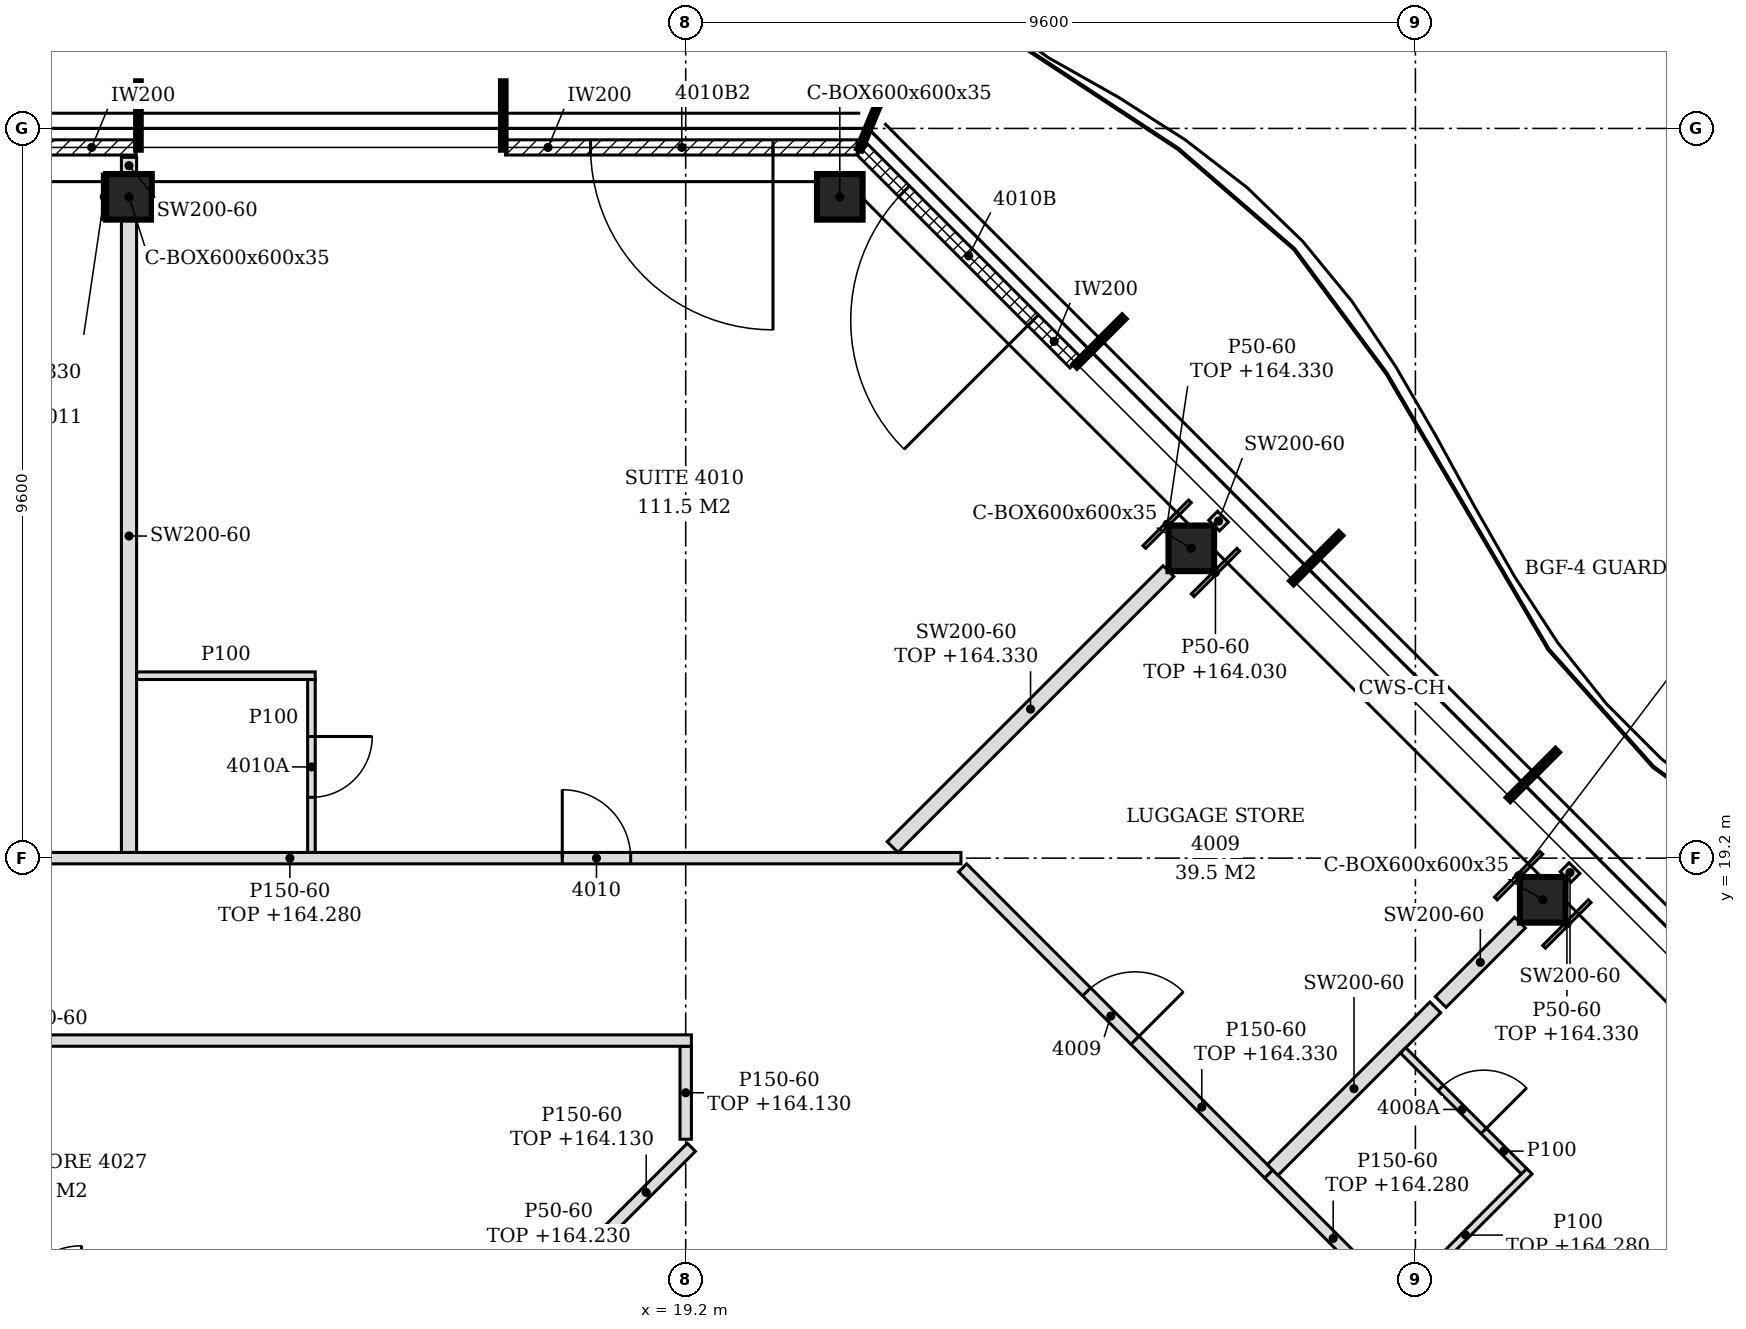
"""IFC4 building model, lengths in metres.
Left out: names, types, materials, properties, quantities, classifications, styles, units other than length and angle.
Written with IfcOpenShell. Run it as: python <this file> out.ifc"""

import sys

from ifc_helpers import new_model, si_unit, direction, frame, frame_2d, origin, origin_2d, place, context, subcontext, project, spatial, polyline, rectangle, hollow_rectangle, outline, extrude, element, fill, save


model = new_model("IFC4")
c1 = context("Model", 3, precision=1e-05, world=origin(), true_north=direction((0.0, 1.0)))
c2 = subcontext(c1, "Body", "Model", "MODEL_VIEW")
j1 = project(units=[si_unit("LENGTHUNIT", "METRE"), si_unit("PLANEANGLEUNIT", "RADIAN")], contexts=[c1])
p1 = place(None, origin())
s1 = spatial("IfcSite", under=j1, at=p1, CompositionType="ELEMENT")
p2 = place(p1, origin())
s2 = spatial("IfcBuilding", under=s1, at=p2, CompositionType="ELEMENT")
p3 = place(p2, frame((0.0, 0.0, 161.4)))
s3 = spatial("IfcBuildingStorey", under=s2, at=p3, CompositionType="ELEMENT", Elevation=161.4)
for number, where, z_axis, x_axis in (
    (1, (30.476, 18.652, -0.15), (0.0, 0.0, 1.0), (1.0, 0.0, 0.0)),
    (2, (25.852, 23.276, -0.15), (0.0, 0.0, 1.0), (1.0, 0.0, 0.0)),
    (3, (21.227, 27.9, -0.15), (0.0, 0.0, 1.0), (1.0, 0.0, 0.0)),
    (4, (11.876, 27.9, -0.15), (0.0, 0.0, 1.0), (1.0, 0.0, 0.0)),
):
    element("IfcColumn", number, at=place(p3, frame(where, z_axis=z_axis, x_axis=x_axis)), inside=s3, PredefinedType="COLUMN", context=c2, shape_type="SweptSolid", body=[
        extrude(hollow_rectangle(XDim=0.6, YDim=0.6, WallThickness=0.035, at=origin_2d()), origin(), (0.0, 0.0, 1.0), 3.6),
    ])
p4 = place(p3, frame((24.326, 25.72, 0.0), z_axis=(0.0, 0.0, 1.0), x_axis=(-0.707106781187, 0.707106781187, 0.0)))
e5 = element("IfcWall", 5, at=p4, inside=s3, PredefinedType="NOTDEFINED", context=c2, shape_type="SweptSolid", body=[
    extrude(rectangle(XDim=3.962, YDim=0.2, at=frame_2d((1.981, 0.0))), origin(), (0.0, 0.0, 1.0), 3.45),
])
p5 = place(p4, frame((0.786, 0.0, 0.0)))
e6 = element("IfcOpeningElement", 6, at=p5, cuts=e5, PredefinedType="OPENING", context=c2, shape_type="SweptSolid", body=[
    extrude(rectangle(XDim=2.4, YDim=2.4, at=frame_2d((1.2, 1.2))), frame((0.0, 0.11, 0.0), z_axis=(0.0, -1.0, 0.0), x_axis=(1.0, 0.0, 0.0)), (0.0, 0.0, 1.0), 0.22),
])
p6 = place(p3, frame((21.457, 28.55, 0.0), z_axis=(0.0, 0.0, 1.0), x_axis=(-1.0, 0.0, 0.0)))
e7 = element("IfcWall", 7, at=p6, inside=s3, PredefinedType="NOTDEFINED", context=c2, shape_type="SweptSolid", body=[
    extrude(rectangle(XDim=4.626, YDim=0.2, at=frame_2d((2.313, 0.0))), origin(), (0.0, 0.0, 1.0), 3.45),
])
p7 = place(p6, frame((1.108, 0.0, 0.0)))
e8 = element("IfcOpeningElement", 8, at=p7, cuts=e7, PredefinedType="OPENING", context=c2, shape_type="SweptSolid", body=[
    extrude(rectangle(XDim=2.4, YDim=2.4, at=frame_2d((1.2, 1.2))), frame((0.0, 0.11, 0.0), z_axis=(0.0, -1.0, 0.0), x_axis=(1.0, 0.0, 0.0)), (0.0, 0.0, 1.0), 0.22),
])
p8 = place(p3, frame((11.97, 28.55, 0.0), z_axis=(0.0, 0.0, 1.0), x_axis=(-1.0, 0.0, 0.0)))
e9 = element("IfcWall", 9, at=p8, inside=s3, PredefinedType="NOTDEFINED", context=c2, shape_type="SweptSolid", body=[
    extrude(rectangle(XDim=4.74, YDim=0.2, at=frame_2d((2.37, 0.0))), origin(), (0.0, 0.0, 1.0), 3.45),
])
p9 = place(p8, frame((1.17, 0.0, 0.0)))
e10 = element("IfcOpeningElement", 10, at=p9, cuts=e9, PredefinedType="OPENING", context=c2, shape_type="SweptSolid", body=[
    extrude(rectangle(XDim=2.4, YDim=2.4, at=frame_2d((1.2, 1.2))), frame((0.0, 0.11, 0.0), z_axis=(0.0, -1.0, 0.0), x_axis=(1.0, 0.0, 0.0)), (0.0, 0.0, 1.0), 0.22),
])
p10 = place(p3, frame((28.567, 13.348, 0.0), z_axis=(0.0, 0.0, 1.0), x_axis=(-0.707310148094, 0.706903355773, 0.0)))
e11 = element("IfcWall", 11, at=p10, inside=s3, PredefinedType="PARTITIONING", context=c2, shape_type="SweptSolid", body=[
    extrude(rectangle(XDim=2.401, YDim=0.15, at=frame_2d((1.2, 0.0))), origin(), (0.0, 0.0, 1.0), 2.88),
])
p11 = place(p3, frame((19.002, 13.398, 0.0), z_axis=(0.0, 0.0, 1.0), x_axis=(-0.707000200921, 0.70721334539, 0.0)))
e12 = element("IfcWall", 12, at=p11, inside=s3, PredefinedType="PARTITIONING", context=c2, shape_type="SweptSolid", body=[
    extrude(rectangle(XDim=1.146, YDim=0.15, at=frame_2d((0.573, 0.0))), origin(), (0.0, 0.0, 1.0), 3.45),
])
p12 = place(p3, frame((28.62, 13.401, 0.0), z_axis=(0.0, 0.0, 1.0), x_axis=(0.707055379538, 0.707158179099, 0.0)))
e13 = element("IfcWall", 13, at=p12, inside=s3, PredefinedType="PARTITIONING", context=c2, shape_type="SweptSolid", body=[
    extrude(rectangle(XDim=2.375, YDim=0.1, at=frame_2d((1.188, 0.0))), origin(), (0.0, 0.0, 1.0), 2.88),
])
p13 = place(p3, frame((18.086, 14.208, 0.0), z_axis=(0.0, 0.0, 1.0), x_axis=(0.70739723372, 0.706816209298, 0.0)))
e14 = element("IfcWall", 14, at=p13, inside=s3, PredefinedType="PARTITIONING", context=c2, shape_type="SweptSolid", body=[
    extrude(rectangle(XDim=1.681, YDim=0.15, at=frame_2d((0.84, 0.0))), origin(), (0.0, 0.0, 1.0), 2.73),
])
p14 = place(p3, frame((26.869, 15.045, 0.0), z_axis=(0.0, 0.0, 1.0), x_axis=(-0.706999586952, 0.707213959174, 0.0)))
e15 = element("IfcWall", 15, at=p14, inside=s3, PredefinedType="PARTITIONING", context=c2, shape_type="SweptSolid", body=[
    extrude(rectangle(XDim=5.694, YDim=0.15, at=frame_2d((2.847, 0.0))), origin(), (0.0, 0.0, 1.0), 2.93),
])
p15 = place(p14, frame((2.487, 0.0, 0.0)))
e16 = element("IfcOpeningElement", 16, at=p15, cuts=e15, PredefinedType="OPENING", context=c2, shape_type="SweptSolid", body=[
    extrude(rectangle(XDim=0.9, YDim=2.1, at=frame_2d((0.45, 1.05))), frame((0.0, 0.085, 0.0), z_axis=(0.0, -1.0, 0.0), x_axis=(1.0, 0.0, 0.0)), (0.0, 0.0, 1.0), 0.17),
])
p16 = place(p3, frame((26.922, 15.098, 0.0), z_axis=(0.0, 0.0, 1.0), x_axis=(0.707268147401, 0.706945378138, 0.0)))
e17 = element("IfcWall", 17, at=p16, inside=s3, PredefinedType="PARTITIONING", context=c2, shape_type="SweptSolid", body=[
    extrude(rectangle(XDim=3.026, YDim=0.2, at=frame_2d((1.513, 0.0))), origin(), (0.0, 0.0, 1.0), 3.45),
])
p17 = place(p3, frame((30.229, 15.08, 0.0), z_axis=(0.0, 0.0, 1.0), x_axis=(-0.707052524, 0.70716103421, 0.0)))
e18 = element("IfcWall", 18, at=p17, inside=s3, PredefinedType="PARTITIONING", context=c2, shape_type="SweptSolid", body=[
    extrude(rectangle(XDim=2.25, YDim=0.1, at=frame_2d((1.125, 0.0))), origin(), (0.0, 0.0, 1.0), 3.45),
])
p18 = place(p17, frame((0.75, 0.0, 0.0)))
e19 = element("IfcOpeningElement", 19, at=p18, cuts=e18, PredefinedType="OPENING", context=c2, shape_type="SweptSolid", body=[
    extrude(rectangle(XDim=0.8, YDim=2.1, at=frame_2d((0.4, 1.05))), frame((0.0, 0.06, 0.0), z_axis=(0.0, -1.0, 0.0), x_axis=(1.0, 0.0, 0.0)), (0.0, 0.0, 1.0), 0.12),
])
p19 = place(p3, frame((19.2, 15.502, 0.0), z_axis=(0.0, 0.0, 1.0), x_axis=(0.0, 1.0, 0.0)))
e20 = element("IfcWall", 20, at=p19, inside=s3, PredefinedType="PARTITIONING", context=c2, shape_type="SweptSolid", body=[
    extrude(rectangle(XDim=1.223, YDim=0.15, at=frame_2d((0.612, 0.0))), origin(), (0.0, 0.0, 1.0), 2.73),
])
p20 = place(p3, frame((2.325, 16.8, 0.0), z_axis=(0.0, 0.0, 1.0), x_axis=(1.0, 0.0, 0.0)))
e21 = element("IfcWall", 21, at=p20, inside=s3, PredefinedType="PARTITIONING", context=c2, shape_type="SweptSolid", body=[
    extrude(outline(polyline([(0.0, 0.0), (16.95, 0.0), (16.95, 2.73), (16.725, 2.73), (16.723, 3.45), (5.025, 3.45), (5.023, 2.73), (4.725, 2.73), (4.723, 3.45), (0.0, 3.45), (0.0, 0.0)])), frame((0.0, 0.075, 0.0), z_axis=(0.0, -1.0, 0.0), x_axis=(1.0, 0.0, 0.0)), (0.0, 0.0, 1.0), 0.15),
])
p21 = place(p3, frame((29.133, 17.308, 0.0), z_axis=(0.0, 0.0, 1.0), x_axis=(0.707024044771, 0.707189507922, 0.0)))
e22 = element("IfcWall", 22, at=p21, inside=s3, PredefinedType="PARTITIONING", context=c2, shape_type="SweptSolid", body=[
    extrude(rectangle(XDim=1.476, YDim=0.2, at=frame_2d((0.738, 0.0))), origin(), (0.0, 0.0, 1.0), 3.45),
])
p22 = place(p3, frame((30.776, 18.951, 0.0), z_axis=(0.0, 0.0, 1.0), x_axis=(0.706370595651, 0.707842201059, 0.0)))
e23 = element("IfcWall", 23, at=p22, inside=s3, PredefinedType="PARTITIONING", context=c2, shape_type="SweptSolid", body=[
    extrude(rectangle(XDim=0.166, YDim=0.2, at=frame_2d((0.083, 0.0))), origin(), (0.0, 0.0, 1.0), 3.45),
])
p23 = place(p3, frame((-8.421, 19.2, 0.0), z_axis=(0.0, 0.0, 1.0), x_axis=(1.0, 0.0, 0.0)))
e24 = element("IfcWall", 24, at=p23, inside=s3, PredefinedType="PARTITIONING", context=c2, shape_type="SweptSolid", body=[
    extrude(outline(polyline([(0.0, 0.0), (31.242, 0.0), (31.242, 2.88), (27.771, 2.88), (27.769, 2.73), (27.471, 2.73), (27.469, 2.88), (15.771, 2.88), (15.769, 2.73), (15.471, 2.73), (15.469, 2.88), (3.771, 2.88), (3.769, 2.73), (3.471, 2.73), (3.469, 2.88), (0.0, 2.88), (0.0, 0.0)])), frame((0.0, 0.075, 0.0), z_axis=(0.0, -1.0, 0.0), x_axis=(1.0, 0.0, 0.0)), (0.0, 0.0, 1.0), 0.15),
])
p24 = place(p23, frame((25.997, 0.0, 0.0)))
e25 = element("IfcOpeningElement", 25, at=p24, cuts=e24, PredefinedType="OPENING", context=c2, shape_type="SweptSolid", body=[
    extrude(rectangle(XDim=0.9, YDim=2.1, at=frame_2d((0.45, 1.05))), frame((0.0, 0.085, 0.0), z_axis=(0.0, -1.0, 0.0), x_axis=(1.0, 0.0, 0.0)), (0.0, 0.0, 1.0), 0.17),
])
p25 = place(p23, frame((17.93, 0.0, 0.0)))
e26 = element("IfcOpeningElement", 26, at=p25, cuts=e24, PredefinedType="OPENING", context=c2, shape_type="SweptSolid", body=[
    extrude(rectangle(XDim=0.9, YDim=2.1, at=frame_2d((0.45, 1.05))), frame((0.0, 0.085, 0.0), z_axis=(0.0, -1.0, 0.0), x_axis=(1.0, 0.0, 0.0)), (0.0, 0.0, 1.0), 0.17),
])
p26 = place(p23, frame((14.754, 0.0, 0.0)))
e27 = element("IfcOpeningElement", 27, at=p26, cuts=e24, PredefinedType="OPENING", context=c2, shape_type="SweptSolid", body=[
    extrude(rectangle(XDim=0.9, YDim=2.1, at=frame_2d((0.45, 1.05))), frame((0.0, 0.085, 0.0), z_axis=(0.0, -1.0, 0.0), x_axis=(1.0, 0.0, 0.0)), (0.0, 0.0, 1.0), 0.17),
])
p27 = place(p23, frame((9.057, 0.0, 0.0)))
e28 = element("IfcOpeningElement", 28, at=p27, cuts=e24, PredefinedType="OPENING", context=c2, shape_type="SweptSolid", body=[
    extrude(rectangle(XDim=0.9, YDim=2.1, at=frame_2d((0.45, 1.05))), frame((0.0, 0.085, 0.0), z_axis=(0.0, -1.0, 0.0), x_axis=(1.0, 0.0, 0.0)), (0.0, 0.0, 1.0), 0.17),
])
p28 = place(p23, frame((2.907, 0.0, 0.0)))
e29 = element("IfcOpeningElement", 29, at=p28, cuts=e24, PredefinedType="OPENING", context=c2, shape_type="SweptSolid", body=[
    extrude(rectangle(XDim=0.9, YDim=2.1, at=frame_2d((0.45, 1.05))), frame((0.0, 0.085, 0.0), z_axis=(0.0, -1.0, 0.0), x_axis=(1.0, 0.0, 0.0)), (0.0, 0.0, 1.0), 0.17),
])
p29 = place(p3, frame((11.876, 19.275, 0.0), z_axis=(0.0, 0.0, 1.0), x_axis=(0.0, 1.0, 0.0)))
e30 = element("IfcWall", 30, at=p29, inside=s3, PredefinedType="PARTITIONING", context=c2, shape_type="SweptSolid", body=[
    extrude(outline(polyline([(0.0, 0.0), (8.325, 0.0), (8.325, 3.45), (4.83, 3.45), (4.828, 2.88), (4.62, 2.88), (4.618, 3.45), (0.03, 3.45), (0.028, 2.88), (0.0, 2.88), (0.0, 0.0)])), frame((0.0, 0.1, 0.0), z_axis=(0.0, -1.0, 0.0), x_axis=(1.0, 0.0, 0.0)), (0.0, 0.0, 1.0), 0.2),
])
p30 = place(p3, frame((14.276, 19.275, 0.0), z_axis=(0.0, 0.0, 1.0), x_axis=(0.0, 1.0, 0.0)))
e31 = element("IfcWall", 31, at=p30, inside=s3, PredefinedType="PARTITIONING", context=c2, shape_type="SweptSolid", body=[
    extrude(outline(polyline([(0.0, 0.0), (2.275, 0.0), (2.275, 3.45), (0.03, 3.45), (0.028, 2.88), (0.0, 2.88), (0.0, 0.0)])), frame((0.0, 0.05, 0.0), z_axis=(0.0, -1.0, 0.0), x_axis=(1.0, 0.0, 0.0)), (0.0, 0.0, 1.0), 0.1),
])
p31 = place(p30, frame((0.725, 0.0, 0.0)))
e32 = element("IfcOpeningElement", 32, at=p31, cuts=e31, PredefinedType="OPENING", context=c2, shape_type="SweptSolid", body=[
    extrude(rectangle(XDim=0.8, YDim=2.1, at=frame_2d((0.4, 1.05))), frame((0.0, 0.06, 0.0), z_axis=(0.0, -1.0, 0.0), x_axis=(1.0, 0.0, 0.0)), (0.0, 0.0, 1.0), 0.12),
])
p32 = place(p3, frame((21.922, 19.346, 0.0), z_axis=(0.0, 0.0, 1.0), x_axis=(0.707106781187, 0.707106781187, 0.0)))
e33 = element("IfcWall", 33, at=p32, inside=s3, PredefinedType="PARTITIONING", context=c2, shape_type="SweptSolid", body=[
    extrude(rectangle(XDim=5.134, YDim=0.2, at=frame_2d((2.567, 0.0))), origin(), (0.0, 0.0, 1.0), 2.93),
])
p33 = place(p3, frame((11.976, 21.6, 0.0), z_axis=(0.0, 0.0, 1.0), x_axis=(1.0, 0.0, 0.0)))
e34 = element("IfcWall", 34, at=p33, inside=s3, PredefinedType="PARTITIONING", context=c2, shape_type="SweptSolid", body=[
    extrude(rectangle(XDim=2.35, YDim=0.1, at=frame_2d((1.175, 0.0))), origin(), (0.0, 0.0, 1.0), 3.45),
])
p34 = place(p3, frame((26.152, 23.576, 0.0), z_axis=(0.0, 0.0, 1.0), x_axis=(0.707106781187, 0.707106781187, 0.0)))
e35 = element("IfcWall", 35, at=p34, inside=s3, PredefinedType="PARTITIONING", context=c2, shape_type="SweptSolid", body=[
    extrude(rectangle(XDim=0.166, YDim=0.2, at=frame_2d((0.083, 0.0))), origin(), (0.0, 0.0, 1.0), 3.45),
])
p35 = place(p3, frame((11.876, 28.2, 0.0), z_axis=(0.0, 0.0, 1.0), x_axis=(0.0, 1.0, 0.0)))
e36 = element("IfcWall", 36, at=p35, inside=s3, PredefinedType="PARTITIONING", context=c2, shape_type="SweptSolid", body=[
    extrude(rectangle(XDim=0.22, YDim=0.2, at=frame_2d((0.11, 0.0))), origin(), (0.0, 0.0, 1.0), 3.45),
])
p36 = place(p3, frame((29.858, 18.669, 0.0), z_axis=(0.0, 0.0, 1.0), x_axis=(0.707106781187, 0.707106781187, 0.0)))
e37 = element("IfcWall", 37, at=p36, inside=s3, PredefinedType="PARTITIONING", context=c2, shape_type="SweptSolid", body=[
    extrude(rectangle(XDim=0.849, YDim=0.05, at=frame_2d((0.424, 0.0))), origin(), (0.0, 0.0, 1.0), 2.63),
])
p37 = place(p3, frame((30.493, 18.034, 0.0), z_axis=(0.0, 0.0, 1.0), x_axis=(0.707106781187, 0.707106781187, 0.0)))
e38 = element("IfcWall", 38, at=p37, inside=s3, PredefinedType="PARTITIONING", context=c2, shape_type="SweptSolid", body=[
    extrude(rectangle(XDim=0.849, YDim=0.05, at=frame_2d((0.424, 0.0))), origin(), (0.0, 0.0, 1.0), 2.93),
])
p38 = place(p3, frame((11.551, 27.6, 0.0), z_axis=(0.0, 0.0, 1.0), x_axis=(0.0, 1.0, 0.0)))
e39 = element("IfcWall", 39, at=p38, inside=s3, PredefinedType="PARTITIONING", context=c2, shape_type="SweptSolid", body=[
    extrude(rectangle(XDim=0.6, YDim=0.05, at=frame_2d((0.3, 0.0))), origin(), (0.0, 0.0, 1.0), 2.93),
])
p39 = place(p3, frame((25.234, 23.293, 0.0), z_axis=(0.0, 0.0, 1.0), x_axis=(0.707106781187, 0.707106781187, 0.0)))
e40 = element("IfcWall", 40, at=p39, inside=s3, PredefinedType="PARTITIONING", context=c2, shape_type="SweptSolid", body=[
    extrude(rectangle(XDim=0.848, YDim=0.05, at=frame_2d((0.424, 0.0))), origin(), (0.0, 0.0, 1.0), 2.93),
])
p40 = place(p3, frame((25.869, 22.658, 0.0), z_axis=(0.0, 0.0, 1.0), x_axis=(0.707106781187, 0.707106781187, 0.0)))
e41 = element("IfcWall", 41, at=p40, inside=s3, PredefinedType="PARTITIONING", context=c2, shape_type="SweptSolid", body=[
    extrude(rectangle(XDim=0.849, YDim=0.05, at=frame_2d((0.424, 0.0))), origin(), (0.0, 0.0, 1.0), 2.63),
])
p41 = place(p5, origin())
e42 = element("IfcDoor", 42, at=p41, inside=s3, OperationType="SINGLE_SWING_LEFT", PredefinedType="DOOR", context=c2, shape_type="SweptSolid", body=[
    extrude(rectangle(XDim=2.4, YDim=2.4, at=frame_2d((1.2, 1.2))), frame((0.0, 0.025, 0.0), z_axis=(0.0, -1.0, 0.0), x_axis=(1.0, 0.0, 0.0)), (0.0, 0.0, 1.0), 0.05),
])
fill(e6, e42)
p42 = place(p7, origin())
e43 = element("IfcDoor", 43, at=p42, inside=s3, OperationType="SINGLE_SWING_LEFT", PredefinedType="DOOR", context=c2, shape_type="SweptSolid", body=[
    extrude(rectangle(XDim=2.4, YDim=2.4, at=frame_2d((1.2, 1.2))), frame((0.0, 0.025, 0.0), z_axis=(0.0, -1.0, 0.0), x_axis=(1.0, 0.0, 0.0)), (0.0, 0.0, 1.0), 0.05),
])
fill(e8, e43)
p43 = place(p18, frame((0.8, 0.0, 0.0), z_axis=(0.0, 0.0, 1.0), x_axis=(-1.0, 0.0, 0.0)))
e44 = element("IfcDoor", 44, at=p43, inside=s3, OperationType="SINGLE_SWING_RIGHT", PredefinedType="DOOR", context=c2, shape_type="SweptSolid", body=[
    extrude(rectangle(XDim=0.8, YDim=2.1, at=frame_2d((0.4, 1.05))), frame((0.0, 0.025, 0.0), z_axis=(0.0, -1.0, 0.0), x_axis=(1.0, 0.0, 0.0)), (0.0, 0.0, 1.0), 0.05),
])
fill(e19, e44)
p44 = place(p15, frame((0.9, 0.0, 0.0), z_axis=(0.0, 0.0, 1.0), x_axis=(-1.0, 0.0, 0.0)))
e45 = element("IfcDoor", 45, at=p44, inside=s3, OperationType="SINGLE_SWING_RIGHT", PredefinedType="DOOR", context=c2, shape_type="SweptSolid", body=[
    extrude(rectangle(XDim=0.9, YDim=2.1, at=frame_2d((0.45, 1.05))), frame((0.0, 0.025, 0.0), z_axis=(0.0, -1.0, 0.0), x_axis=(1.0, 0.0, 0.0)), (0.0, 0.0, 1.0), 0.05),
])
fill(e16, e45)
p45 = place(p24, origin())
e46 = element("IfcDoor", 46, at=p45, inside=s3, OperationType="SINGLE_SWING_LEFT", PredefinedType="DOOR", context=c2, shape_type="SweptSolid", body=[
    extrude(rectangle(XDim=0.9, YDim=2.1, at=frame_2d((0.45, 1.05))), frame((0.0, 0.025, 0.0), z_axis=(0.0, -1.0, 0.0), x_axis=(1.0, 0.0, 0.0)), (0.0, 0.0, 1.0), 0.05),
])
fill(e25, e46)
p46 = place(p31, frame((0.8, 0.0, 0.0), z_axis=(0.0, 0.0, 1.0), x_axis=(-1.0, 0.0, 0.0)))
e47 = element("IfcDoor", 47, at=p46, inside=s3, OperationType="SINGLE_SWING_LEFT", PredefinedType="DOOR", context=c2, shape_type="SweptSolid", body=[
    extrude(rectangle(XDim=0.8, YDim=2.1, at=frame_2d((0.4, 1.05))), frame((0.0, 0.025, 0.0), z_axis=(0.0, -1.0, 0.0), x_axis=(1.0, 0.0, 0.0)), (0.0, 0.0, 1.0), 0.05),
])
fill(e32, e47)
save(model, sys.argv[1])
